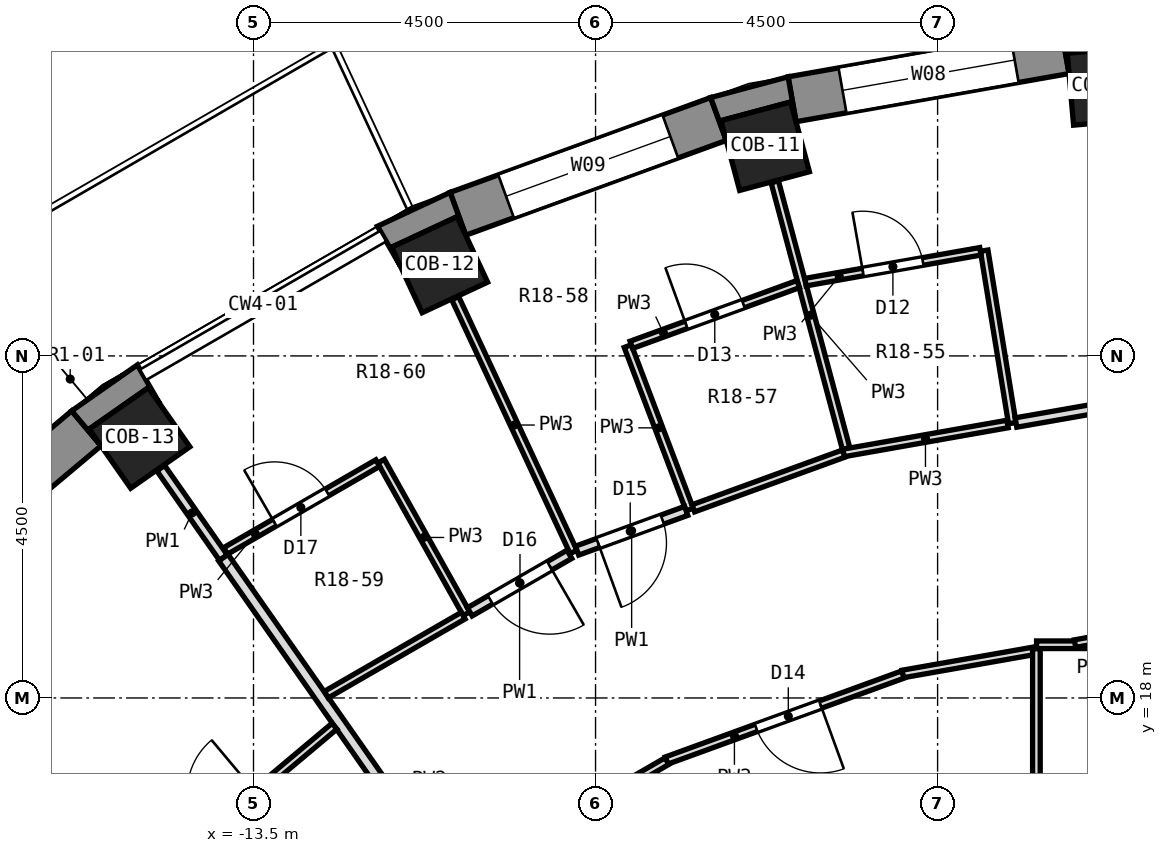
"""IFC4 building model, lengths in metres.
Left out: names, types, materials, properties, quantities, classifications, styles, units other than length and angle.
Written with IfcOpenShell. Run it as: python <this file> out.ifc"""

import sys

from ifc_helpers import new_model, si_unit, direction, frame, frame_2d, origin, origin_2d, place, context, subcontext, project, spatial, polyline, rectangle, outline, extrude, element, fill, save


model = new_model("IFC4")
c1 = context("Model", 3, precision=1e-05, world=origin(), true_north=direction((0.0, 1.0)))
c2 = subcontext(c1, "Body", "Model", "MODEL_VIEW")
j1 = project(units=[si_unit("LENGTHUNIT", "METRE"), si_unit("PLANEANGLEUNIT", "RADIAN")], contexts=[c1])
p1 = place(None, origin())
s1 = spatial("IfcSite", under=j1, at=p1, CompositionType="ELEMENT")
p2 = place(p1, origin())
s2 = spatial("IfcBuilding", under=s1, at=p2, CompositionType="ELEMENT")
p3 = place(p2, frame((0.0, 0.0, 101.8)))
s3 = spatial("IfcBuildingStorey", under=s2, at=p3, CompositionType="ELEMENT", Elevation=101.8)
for number, where, z_axis, x_axis in (
    (1, (-2.279, 26.051, 0.0), (0.0, 0.0, 1.0), (-0.087, 0.996, 0.0)),
    (2, (-6.768, 25.259, 0.0), (0.0, 0.0, 1.0), (-0.259, 0.966, 0.0)),
    (3, (-11.052, 23.7, 0.0), (0.0, 0.0, 1.0), (-0.423, 0.906, 0.0)),
    (4, (-14.999, 21.421, 0.0), (0.0, 0.0, 1.0), (-0.574, 0.819, 0.0)),
):
    element("IfcColumn", number, at=place(p3, frame(where, z_axis=z_axis, x_axis=x_axis)), inside=s3, PredefinedType="COLUMN", context=c2, shape_type="SweptSolid", body=[
        extrude(rectangle(XDim=0.95, YDim=0.95, at=origin_2d()), origin(), (0.0, 0.0, 1.0), 3.3),
    ])
p4 = place(p3, frame((-2.822, 26.51, 0.0), z_axis=(0.0, 0.0, 1.0), x_axis=(-0.984803764455, -0.173670796382, 0.0)))
e5 = element("IfcWall", 5, at=p4, inside=s3, PredefinedType="SOLIDWALL", context=c2, shape_type="SweptSolid", body=[
    extrude(rectangle(XDim=3.648, YDim=0.6, at=frame_2d((1.824, 0.0))), origin(), (0.0, 0.0, 1.0), 2.8),
])
p5 = place(p4, frame((0.674, 0.0, 0.9)))
e6 = element("IfcOpeningElement", 6, at=p5, cuts=e5, PredefinedType="OPENING", context=c2, shape_type="SweptSolid", body=[
    extrude(rectangle(XDim=2.3, YDim=1.8, at=frame_2d((1.15, 0.9))), frame((0.0, 0.312, 0.0), z_axis=(0.0, -1.0, 0.0), x_axis=(1.0, 0.0, 0.0)), (0.0, 0.0, 1.0), 0.624),
])
p6 = place(p3, frame((-7.383, 25.617, 0.0), z_axis=(0.0, 0.0, 1.0), x_axis=(-0.939703505393, -0.341990236633, 0.0)))
e7 = element("IfcWall", 7, at=p6, inside=s3, PredefinedType="SOLIDWALL", context=c2, shape_type="SweptSolid", body=[
    extrude(rectangle(XDim=3.648, YDim=0.6, at=frame_2d((1.824, 0.0))), origin(), (0.0, 0.0, 1.0), 2.8),
])
p7 = place(p6, frame((0.674, 0.0, 0.9)))
e8 = element("IfcOpeningElement", 8, at=p7, cuts=e7, PredefinedType="OPENING", context=c2, shape_type="SweptSolid", body=[
    extrude(rectangle(XDim=2.3, YDim=1.8, at=frame_2d((1.15, 0.9))), frame((0.0, 0.312, 0.0), z_axis=(0.0, -1.0, 0.0), x_axis=(1.0, 0.0, 0.0)), (0.0, 0.0, 1.0), 0.624),
])
p8 = place(p3, frame((-15.699, 21.547, 0.0), z_axis=(0.0, 0.0, 1.0), x_axis=(-0.766055462616, -0.642774476932, 0.0)))
e9 = element("IfcWall", 9, at=p8, inside=s3, PredefinedType="SOLIDWALL", context=c2, shape_type="SweptSolid", body=[
    extrude(rectangle(XDim=3.648, YDim=0.6, at=frame_2d((1.824, 0.0))), origin(), (0.0, 0.0, 1.0), 2.8),
])
p9 = place(p8, frame((0.974, 0.0, 0.0)))
e10 = element("IfcOpeningElement", 10, at=p9, cuts=e9, PredefinedType="OPENING", context=c2, shape_type="SweptSolid", body=[
    extrude(rectangle(XDim=1.7, YDim=2.4, at=frame_2d((0.85, 1.2))), frame((0.0, 0.312, 0.0), z_axis=(0.0, -1.0, 0.0), x_axis=(1.0, 0.0, 0.0)), (0.0, 0.0, 1.0), 0.624),
])
p10 = place(p3, origin())
e11 = element("IfcWall", 11, at=p10, inside=s3, PredefinedType="SOLIDWALL", context=c2, shape_type="SweptSolid", body=[
    extrude(outline(polyline([(-2.875, 26.805), (-2.77, 26.215), (-2.794, 26.482), (-1.847, 26.565), (-1.824, 26.297), (-1.824, 26.897), (-2.875, 26.805)])), origin(), (0.0, 0.0, 1.0), 2.8),
])
p11 = place(p3, origin())
e12 = element("IfcWall", 12, at=p11, inside=s3, PredefinedType="SOLIDWALL", context=c2, shape_type="SweptSolid", body=[
    extrude(outline(polyline([(-6.467, 26.172), (-7.486, 25.899), (-7.28, 25.335), (-7.35, 25.595), (-6.432, 25.841), (-6.363, 25.581), (-6.467, 26.172)])), origin(), (0.0, 0.0, 1.0), 2.8),
])
p12 = place(p3, origin())
e13 = element("IfcWall", 13, at=p12, inside=s3, PredefinedType="SOLIDWALL", context=c2, shape_type="SweptSolid", body=[
    extrude(outline(polyline([(-10.913, 24.651), (-11.869, 24.206), (-11.569, 23.686), (-11.683, 23.93), (-10.822, 24.331), (-10.708, 24.087), (-10.913, 24.651)])), origin(), (0.0, 0.0, 1.0), 2.8),
])
p13 = place(p3, origin())
e14 = element("IfcWall", 14, at=p13, inside=s3, PredefinedType="SOLIDWALL", context=c2, shape_type="SweptSolid", body=[
    extrude(outline(polyline([(-15.892, 21.777), (-15.506, 21.317), (-15.661, 21.538), (-14.882, 22.083), (-14.728, 21.862), (-15.028, 22.382), (-15.892, 21.777)])), origin(), (0.0, 0.0, 1.0), 2.8),
])
p14 = place(p3, frame((-3.887, 23.885, 0.0), z_axis=(0.0, 0.0, 1.0), x_axis=(0.160403826344, -0.987051474085, 0.0)))
e15 = element("IfcWall", 15, at=p14, inside=s3, PredefinedType="PARTITIONING", context=c2, shape_type="SweptSolid", body=[
    extrude(rectangle(XDim=2.3, YDim=0.1, at=frame_2d((1.15, 0.0))), origin(), (0.0, 0.0, 1.0), 2.8),
])
p15 = place(p3, frame((-6.642, 24.791, 0.0), z_axis=(0.0, 0.0, 1.0), x_axis=(0.258373404153, -0.966045125254, 0.0)))
e16 = element("IfcWall", 16, at=p15, inside=s3, PredefinedType="PARTITIONING", context=c2, shape_type="SweptSolid", body=[
    extrude(rectangle(XDim=3.634, YDim=0.1, at=frame_2d((1.817, 0.0))), origin(), (0.0, 0.0, 1.0), 2.8),
])
p16 = place(p3, frame((-8.576, 22.629, 0.0), z_axis=(0.0, 0.0, 1.0), x_axis=(0.354308635081, -0.935128542558, 0.0)))
e17 = element("IfcWall", 17, at=p16, inside=s3, PredefinedType="PARTITIONING", context=c2, shape_type="SweptSolid", body=[
    extrude(rectangle(XDim=2.3, YDim=0.1, at=frame_2d((1.15, 0.0))), origin(), (0.0, 0.0, 1.0), 2.8),
])
p17 = place(p3, frame((-10.847, 23.26, 0.0), z_axis=(0.0, 0.0, 1.0), x_axis=(0.422500901097, -0.906362503953, 0.0)))
e18 = element("IfcWall", 18, at=p17, inside=s3, PredefinedType="PARTITIONING", context=c2, shape_type="SweptSolid", body=[
    extrude(rectangle(XDim=3.684, YDim=0.1, at=frame_2d((1.842, 0.0))), origin(), (0.0, 0.0, 1.0), 2.8),
])
p18 = place(p3, frame((-11.822, 21.115, 0.0), z_axis=(0.0, 0.0, 1.0), x_axis=(0.488622759198, -0.872495157117, 0.0)))
e19 = element("IfcWall", 19, at=p18, inside=s3, PredefinedType="PARTITIONING", context=c2, shape_type="SweptSolid", body=[
    extrude(rectangle(XDim=2.3, YDim=0.1, at=frame_2d((1.15, 0.0))), origin(), (0.0, 0.0, 1.0), 2.8),
])
p19 = place(p3, frame((-14.721, 21.024, 0.0), z_axis=(0.0, 0.0, 1.0), x_axis=(0.573405364028, -0.819271803801, 0.0)))
e20 = element("IfcWall", 20, at=p19, inside=s3, PredefinedType="PARTITIONING", context=c2, shape_type="SweptSolid", body=[
    extrude(rectangle(XDim=1.438, YDim=0.125, at=frame_2d((0.719, 0.0))), origin(), (0.0, 0.0, 1.0), 2.8),
])
p20 = place(p3, frame((-13.896, 19.846, 0.0), z_axis=(0.0, 0.0, 1.0), x_axis=(0.573571733859, -0.819155336989, 0.0)))
e21 = element("IfcWall", 21, at=p20, inside=s3, PredefinedType="PARTITIONING", context=c2, shape_type="SweptSolid", body=[
    extrude(rectangle(XDim=8.088, YDim=0.15, at=frame_2d((4.044, 0.0))), origin(), (0.0, 0.0, 1.0), 2.8),
])
p21 = place(p3, frame((-3.198, 18.7, 0.0), z_axis=(0.0, 0.0, 1.0), x_axis=(1.0, 0.0, 0.0)))
e22 = element("IfcWall", 22, at=p21, inside=s3, PredefinedType="PARTITIONING", context=c2, shape_type="SweptSolid", body=[
    extrude(rectangle(XDim=1.511, YDim=0.1, at=frame_2d((0.755, 0.0))), origin(), (0.0, 0.0, 1.0), 2.8),
])
p22 = place(p3, frame((-3.469, 21.624, 0.0), z_axis=(0.0, 0.0, 1.0), x_axis=(0.984977719449, 0.172681476106, 0.0)))
e23 = element("IfcWall", 23, at=p22, inside=s3, PredefinedType="PARTITIONING", context=c2, shape_type="SweptSolid", body=[
    extrude(rectangle(XDim=1.514, YDim=0.125, at=frame_2d((0.757, 0.0))), origin(), (0.0, 0.0, 1.0), 2.8),
])
p23 = place(p3, frame((-4.96, 18.315, 0.0), z_axis=(0.0, 0.0, 1.0), x_axis=(0.984767989426, 0.173873537385, 0.0)))
e24 = element("IfcWall", 24, at=p23, inside=s3, PredefinedType="PARTITIONING", context=c2, shape_type="SweptSolid", body=[
    extrude(rectangle(XDim=1.737, YDim=0.1, at=frame_2d((0.868, 0.0))), origin(), (0.0, 0.0, 1.0), 2.8),
])
p24 = place(p3, frame((-2.692, 18.716, 0.0), z_axis=(0.0, 0.0, 1.0), x_axis=(0.984773780307, 0.173840736366, 0.0)))
e25 = element("IfcWall", 25, at=p24, inside=s3, PredefinedType="PARTITIONING", context=c2, shape_type="SweptSolid", body=[
    extrude(rectangle(XDim=1.006, YDim=0.1, at=frame_2d((0.503, 0.0))), origin(), (0.0, 0.0, 1.0), 2.8),
])
p25 = place(p3, frame((-5.739, 21.223, 0.0), z_axis=(0.0, 0.0, 1.0), x_axis=(0.984781317039, 0.173798036845, 0.0)))
e26 = element("IfcWall", 26, at=p25, inside=s3, PredefinedType="PARTITIONING", context=c2, shape_type="SweptSolid", body=[
    extrude(rectangle(XDim=2.193, YDim=0.1, at=frame_2d((1.096, 0.0))), origin(), (0.0, 0.0, 1.0), 2.8),
])
p26 = place(p3, frame((-6.238, 23.471, 0.0), z_axis=(0.0, 0.0, 1.0), x_axis=(0.984817208654, 0.173594543518, 0.0)))
e27 = element("IfcWall", 27, at=p26, inside=s3, PredefinedType="PARTITIONING", context=c2, shape_type="SweptSolid", body=[
    extrude(rectangle(XDim=2.336, YDim=0.1, at=frame_2d((1.168, 0.0))), origin(), (0.0, 0.0, 1.0), 2.8),
])
p27 = place(p26, frame((0.768, 0.0, 0.0)))
e28 = element("IfcOpeningElement", 28, at=p27, cuts=e27, PredefinedType="OPENING", context=c2, shape_type="SweptSolid", body=[
    extrude(rectangle(XDim=0.8, YDim=2.1, at=frame_2d((0.4, 1.05))), frame((0.0, 0.062, 0.0), z_axis=(0.0, -1.0, 0.0), x_axis=(1.0, 0.0, 0.0)), (0.0, 0.0, 1.0), 0.124),
])
p28 = place(p3, frame((-8.066, 17.177, 0.0), z_axis=(0.0, 0.0, 1.0), x_axis=(0.939726606236, 0.341926754629, 0.0)))
e29 = element("IfcWall", 29, at=p28, inside=s3, PredefinedType="PARTITIONING", context=c2, shape_type="SweptSolid", body=[
    extrude(rectangle(XDim=3.308, YDim=0.1, at=frame_2d((1.654, 0.0))), origin(), (0.0, 0.0, 1.0), 2.8),
])
p29 = place(p28, frame((1.254, 0.0, 0.0)))
e30 = element("IfcOpeningElement", 30, at=p29, cuts=e29, PredefinedType="OPENING", context=c2, shape_type="SweptSolid", body=[
    extrude(rectangle(XDim=0.9, YDim=2.1, at=frame_2d((0.45, 1.05))), frame((0.0, 0.062, 0.0), z_axis=(0.0, -1.0, 0.0), x_axis=(1.0, 0.0, 0.0)), (0.0, 0.0, 1.0), 0.124),
])
p30 = place(p3, frame((-7.714, 20.495, 0.0), z_axis=(0.0, 0.0, 1.0), x_axis=(0.939725675468, 0.341929312674, 0.0)))
e31 = element("IfcWall", 31, at=p30, inside=s3, PredefinedType="PARTITIONING", context=c2, shape_type="SweptSolid", body=[
    extrude(rectangle(XDim=2.105, YDim=0.1, at=frame_2d((1.052, 0.0))), origin(), (0.0, 0.0, 1.0), 2.8),
])
p31 = place(p3, frame((-9.243, 19.938, 0.0), z_axis=(0.0, 0.0, 1.0), x_axis=(0.939611268692, 0.342243573711, 0.0)))
e32 = element("IfcWall", 32, at=p31, inside=s3, PredefinedType="PARTITIONING", context=c2, shape_type="SweptSolid", body=[
    extrude(rectangle(XDim=1.527, YDim=0.125, at=frame_2d((0.764, 0.0))), origin(), (0.0, 0.0, 1.0), 2.8),
])
p32 = place(p31, frame((0.294, 0.0, 0.0)))
e33 = element("IfcOpeningElement", 33, at=p32, cuts=e32, PredefinedType="OPENING", context=c2, shape_type="SweptSolid", body=[
    extrude(rectangle(XDim=0.9, YDim=2.1, at=frame_2d((0.45, 1.05))), frame((0.0, 0.074, 0.0), z_axis=(0.0, -1.0, 0.0), x_axis=(1.0, 0.0, 0.0)), (0.0, 0.0, 1.0), 0.149),
])
p33 = place(p3, frame((-8.529, 22.646, 0.0), z_axis=(0.0, 0.0, 1.0), x_axis=(0.939707949959, 0.341978023831, 0.0)))
e34 = element("IfcWall", 34, at=p33, inside=s3, PredefinedType="PARTITIONING", context=c2, shape_type="SweptSolid", body=[
    extrude(rectangle(XDim=2.336, YDim=0.1, at=frame_2d((1.168, 0.0))), origin(), (0.0, 0.0, 1.0), 2.8),
])
p34 = place(p33, frame((0.768, 0.0, 0.0)))
e35 = element("IfcOpeningElement", 35, at=p34, cuts=e34, PredefinedType="OPENING", context=c2, shape_type="SweptSolid", body=[
    extrude(rectangle(XDim=0.8, YDim=2.1, at=frame_2d((0.4, 1.05))), frame((0.0, 0.062, 0.0), z_axis=(0.0, -1.0, 0.0), x_axis=(1.0, 0.0, 0.0)), (0.0, 0.0, 1.0), 0.124),
])
p35 = place(p3, frame((-10.816, 15.578, 0.0), z_axis=(0.0, 0.0, 1.0), x_axis=(0.865900530636, 0.500216224292, 0.0)))
e36 = element("IfcWall", 36, at=p35, inside=s3, PredefinedType="PARTITIONING", context=c2, shape_type="SweptSolid", body=[
    extrude(rectangle(XDim=3.181, YDim=0.1, at=frame_2d((1.591, 0.0))), origin(), (0.0, 0.0, 1.0), 2.8),
])
p36 = place(p3, frame((-12.542, 18.044, 0.0), z_axis=(0.0, 0.0, 1.0), x_axis=(0.866154304779, 0.499776670437, 0.0)))
e37 = element("IfcWall", 37, at=p36, inside=s3, PredefinedType="PARTITIONING", context=c2, shape_type="SweptSolid", body=[
    extrude(rectangle(XDim=2.079, YDim=0.1, at=frame_2d((1.04, 0.0))), origin(), (0.0, 0.0, 1.0), 2.8),
])
p37 = place(p3, frame((-10.655, 19.133, 0.0), z_axis=(0.0, 0.0, 1.0), x_axis=(0.866040510187, 0.49997383403, 0.0)))
e38 = element("IfcWall", 38, at=p37, inside=s3, PredefinedType="PARTITIONING", context=c2, shape_type="SweptSolid", body=[
    extrude(rectangle(XDim=1.513, YDim=0.125, at=frame_2d((0.757, 0.0))), origin(), (0.0, 0.0, 1.0), 2.8),
])
p38 = place(p37, frame((0.313, 0.0, 0.0)))
e39 = element("IfcOpeningElement", 39, at=p38, cuts=e38, PredefinedType="OPENING", context=c2, shape_type="SweptSolid", body=[
    extrude(rectangle(XDim=0.9, YDim=2.1, at=frame_2d((0.45, 1.05))), frame((0.0, 0.074, 0.0), z_axis=(0.0, -1.0, 0.0), x_axis=(1.0, 0.0, 0.0)), (0.0, 0.0, 1.0), 0.149),
])
p39 = place(p3, frame((-13.867, 19.935, 0.0), z_axis=(0.0, 0.0, 1.0), x_axis=(0.866057184078, 0.499944950877, 0.0)))
e40 = element("IfcWall", 40, at=p39, inside=s3, PredefinedType="PARTITIONING", context=c2, shape_type="SweptSolid", body=[
    extrude(rectangle(XDim=2.311, YDim=0.1, at=frame_2d((1.156, 0.0))), origin(), (0.0, 0.0, 1.0), 2.8),
])
p40 = place(p39, frame((0.743, 0.0, 0.0)))
e41 = element("IfcOpeningElement", 41, at=p40, cuts=e40, PredefinedType="OPENING", context=c2, shape_type="SweptSolid", body=[
    extrude(rectangle(XDim=0.8, YDim=2.1, at=frame_2d((0.4, 1.05))), frame((0.0, 0.062, 0.0), z_axis=(0.0, -1.0, 0.0), x_axis=(1.0, 0.0, 0.0)), (0.0, 0.0, 1.0), 0.124),
])
p41 = place(p3, frame((-15.298, 15.226, 0.0), z_axis=(0.0, 0.0, 1.0), x_axis=(0.766080513043, 0.642744620775, 0.0)))
e42 = element("IfcWall", 42, at=p41, inside=s3, PredefinedType="PARTITIONING", context=c2, shape_type="SweptSolid", body=[
    extrude(rectangle(XDim=3.737, YDim=0.1, at=frame_2d((1.869, 0.0))), origin(), (0.0, 0.0, 1.0), 2.8),
])
p42 = place(p41, frame((1.482, 0.0, 0.0)))
e43 = element("IfcOpeningElement", 43, at=p42, cuts=e42, PredefinedType="OPENING", context=c2, shape_type="SweptSolid", body=[
    extrude(rectangle(XDim=0.9, YDim=2.1, at=frame_2d((0.45, 1.05))), frame((0.0, 0.062, 0.0), z_axis=(0.0, -1.0, 0.0), x_axis=(1.0, 0.0, 0.0)), (0.0, 0.0, 1.0), 0.124),
])
p43 = place(p3, frame((-3.2, 16.054, 0.0), z_axis=(0.0, 0.0, 1.0), x_axis=(0.0, 1.0, 0.0)))
e44 = element("IfcWall", 44, at=p43, inside=s3, PredefinedType="PARTITIONING", context=c2, shape_type="SweptSolid", body=[
    extrude(rectangle(XDim=2.594, YDim=0.1, at=frame_2d((1.297, 0.0))), origin(), (0.0, 0.0, 1.0), 2.8),
])
p44 = place(p5, origin())
e45 = element("IfcWindow", 45, at=p44, inside=s3, PartitioningType="SINGLE_PANEL", PredefinedType="WINDOW", context=c2, shape_type="SweptSolid", body=[
    extrude(rectangle(XDim=2.3, YDim=1.8, at=frame_2d((1.15, 0.9))), frame((0.0, 0.18, 0.0), z_axis=(0.0, -1.0, 0.0), x_axis=(1.0, 0.0, 0.0)), (0.0, 0.0, 1.0), 0.06),
])
fill(e6, e45)
p45 = place(p7, origin())
e46 = element("IfcWindow", 46, at=p45, inside=s3, PartitioningType="SINGLE_PANEL", PredefinedType="WINDOW", context=c2, shape_type="SweptSolid", body=[
    extrude(rectangle(XDim=2.3, YDim=1.8, at=frame_2d((1.15, 0.9))), frame((0.0, 0.18, 0.0), z_axis=(0.0, -1.0, 0.0), x_axis=(1.0, 0.0, 0.0)), (0.0, 0.0, 1.0), 0.06),
])
fill(e8, e46)
p46 = place(p27, origin())
e47 = element("IfcDoor", 47, at=p46, inside=s3, OperationType="SINGLE_SWING_LEFT", PredefinedType="DOOR", context=c2, shape_type="SweptSolid", body=[
    extrude(rectangle(XDim=0.8, YDim=2.1, at=frame_2d((0.4, 1.05))), frame((0.0, 0.025, 0.0), z_axis=(0.0, -1.0, 0.0), x_axis=(1.0, 0.0, 0.0)), (0.0, 0.0, 1.0), 0.05),
])
fill(e28, e47)
p47 = place(p34, origin())
e48 = element("IfcDoor", 48, at=p47, inside=s3, OperationType="SINGLE_SWING_LEFT", PredefinedType="DOOR", context=c2, shape_type="SweptSolid", body=[
    extrude(rectangle(XDim=0.8, YDim=2.1, at=frame_2d((0.4, 1.05))), frame((0.0, 0.025, 0.0), z_axis=(0.0, -1.0, 0.0), x_axis=(1.0, 0.0, 0.0)), (0.0, 0.0, 1.0), 0.05),
])
fill(e35, e48)
p48 = place(p29, frame((0.9, 0.0, 0.0), z_axis=(0.0, 0.0, 1.0), x_axis=(-1.0, 0.0, 0.0)))
e49 = element("IfcDoor", 49, at=p48, inside=s3, OperationType="SINGLE_SWING_LEFT", PredefinedType="DOOR", context=c2, shape_type="SweptSolid", body=[
    extrude(rectangle(XDim=0.9, YDim=2.1, at=frame_2d((0.45, 1.05))), frame((0.0, 0.025, 0.0), z_axis=(0.0, -1.0, 0.0), x_axis=(1.0, 0.0, 0.0)), (0.0, 0.0, 1.0), 0.05),
])
fill(e30, e49)
p49 = place(p32, frame((0.9, 0.0, 0.0), z_axis=(0.0, 0.0, 1.0), x_axis=(-1.0, 0.0, 0.0)))
e50 = element("IfcDoor", 50, at=p49, inside=s3, OperationType="SINGLE_SWING_RIGHT", PredefinedType="DOOR", context=c2, shape_type="SweptSolid", body=[
    extrude(rectangle(XDim=0.9, YDim=2.1, at=frame_2d((0.45, 1.05))), frame((0.0, 0.025, 0.0), z_axis=(0.0, -1.0, 0.0), x_axis=(1.0, 0.0, 0.0)), (0.0, 0.0, 1.0), 0.05),
])
fill(e33, e50)
p50 = place(p38, frame((0.9, 0.0, 0.0), z_axis=(0.0, 0.0, 1.0), x_axis=(-1.0, 0.0, 0.0)))
e51 = element("IfcDoor", 51, at=p50, inside=s3, OperationType="SINGLE_SWING_LEFT", PredefinedType="DOOR", context=c2, shape_type="SweptSolid", body=[
    extrude(rectangle(XDim=0.9, YDim=2.1, at=frame_2d((0.45, 1.05))), frame((0.0, 0.025, 0.0), z_axis=(0.0, -1.0, 0.0), x_axis=(1.0, 0.0, 0.0)), (0.0, 0.0, 1.0), 0.05),
])
fill(e39, e51)
p51 = place(p40, origin())
e52 = element("IfcDoor", 52, at=p51, inside=s3, OperationType="SINGLE_SWING_LEFT", PredefinedType="DOOR", context=c2, shape_type="SweptSolid", body=[
    extrude(rectangle(XDim=0.8, YDim=2.1, at=frame_2d((0.4, 1.05))), frame((0.0, 0.025, 0.0), z_axis=(0.0, -1.0, 0.0), x_axis=(1.0, 0.0, 0.0)), (0.0, 0.0, 1.0), 0.05),
])
fill(e41, e52)
save(model, sys.argv[1])
